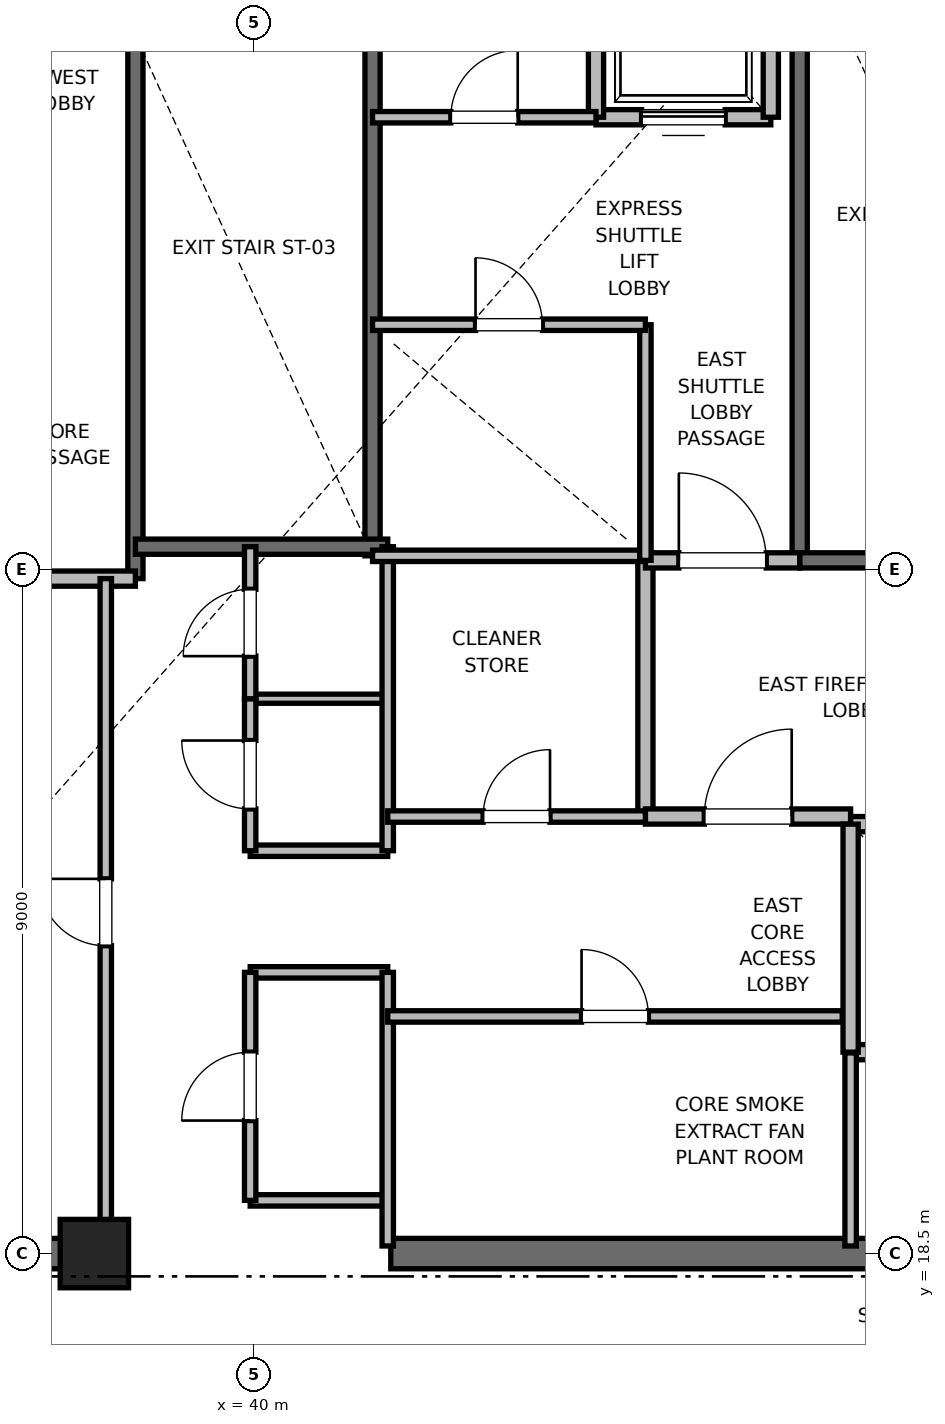
"""IFC4 building model, lengths in metres.
Left out: names, types, materials, properties, quantities, classifications, styles, units other than length and angle.
Written with IfcOpenShell. Run it as: python <this file> out.ifc"""

import sys

from ifc_helpers import new_model, si_unit, direction, frame, frame_2d, origin, origin_2d, place, context, subcontext, project, spatial, rectangle, extrude, element, fill, save


model = new_model("IFC4")
c1 = context("Model", 3, precision=1e-05, world=origin(), true_north=direction((0.0, 1.0)))
c2 = subcontext(c1, "Body", "Model", "MODEL_VIEW")
j1 = project(units=[si_unit("LENGTHUNIT", "METRE"), si_unit("PLANEANGLEUNIT", "RADIAN")], contexts=[c1])
p1 = place(None, origin())
s1 = spatial("IfcSite", under=j1, at=p1, CompositionType="ELEMENT")
p2 = place(p1, origin())
s2 = spatial("IfcBuilding", under=s1, at=p2, CompositionType="ELEMENT")
p3 = place(p2, frame((0.0, 0.0, 354.3)))
s3 = spatial("IfcBuildingStorey", under=s2, at=p3, CompositionType="ELEMENT", Elevation=354.3)
p4 = place(p3, frame((37.9, 18.5, 0.0), z_axis=(0.0, 0.0, 1.0), x_axis=(1.0, 0.0, 0.0)))
e1 = element("IfcColumn", 1, at=p4, inside=s3, PredefinedType="PILASTER", context=c2, shape_type="SweptSolid", body=[
    extrude(rectangle(XDim=0.9, YDim=0.9, at=origin_2d()), origin(), (0.0, 0.0, 1.0), 5.5),
])
for number, where, z_axis, x_axis in (
    (2, (29.0, 18.5, 0.0), (0.0, 0.0, 1.0), (1.0, 0.0, 0.0)),
    (3, (41.8, 18.5, 0.0), (0.0, 0.0, 1.0), (1.0, 0.0, 0.0)),
):
    element("IfcWall", number, at=place(p3, frame(where, z_axis=z_axis, x_axis=x_axis)), inside=s3, PredefinedType="SHEAR", context=c2, shape_type="SweptSolid", body=[
        extrude(rectangle(XDim=9.2, YDim=0.4, at=frame_2d((4.6, 0.0))), origin(), (0.0, 0.0, 1.0), 5.24),
    ])
p5 = place(p3, frame((47.18, 27.62, 0.0), z_axis=(0.0, 0.0, 1.0), x_axis=(0.0, 1.0, 0.0)))
e4 = element("IfcWall", 4, at=p5, inside=s3, PredefinedType="SOLIDWALL", context=c2, shape_type="SweptSolid", body=[
    extrude(rectangle(XDim=8.18, YDim=0.2, at=frame_2d((4.09, 0.0))), origin(), (0.0, 0.0, 1.0), 5.24),
])
p6 = place(p3, frame((47.18, 27.62, 0.0), z_axis=(0.0, 0.0, 1.0), x_axis=(1.0, 0.0, 0.0)))
e5 = element("IfcWall", 5, at=p6, inside=s3, PredefinedType="SOLIDWALL", context=c2, shape_type="SweptSolid", body=[
    extrude(rectangle(XDim=3.12, YDim=0.2, at=frame_2d((1.56, 0.0))), origin(), (0.0, 0.0, 1.0), 5.24),
])
p7 = place(p6, frame((1.01, 0.0, 0.0)))
e6 = element("IfcOpeningElement", 6, at=p7, cuts=e5, PredefinedType="OPENING", context=c2, shape_type="SweptSolid", body=[
    extrude(rectangle(XDim=1.1, YDim=2.15, at=frame_2d((0.55, 1.075))), frame((0.0, 0.1, 0.0), z_axis=(0.0, -1.0, 0.0), x_axis=(1.0, 0.0, 0.0)), (0.0, 0.0, 1.0), 0.2),
])
p8 = place(p3, frame((38.44, 27.38, 0.0), z_axis=(0.0, 0.0, 1.0), x_axis=(0.0, 1.0, 0.0)))
e7 = element("IfcWall", 7, at=p8, inside=s3, PredefinedType="SOLIDWALL", context=c2, shape_type="SweptSolid", body=[
    extrude(rectangle(XDim=8.87, YDim=0.2, at=frame_2d((4.435, 0.0))), origin(), (0.0, 0.0, 1.0), 5.24),
])
p9 = place(p3, frame((41.56, 27.68, 0.0), z_axis=(0.0, 0.0, 1.0), x_axis=(0.0, 1.0, 0.0)))
e8 = element("IfcWall", 8, at=p9, inside=s3, PredefinedType="SOLIDWALL", context=c2, shape_type="SweptSolid", body=[
    extrude(rectangle(XDim=8.57, YDim=0.2, at=frame_2d((4.285, 0.0))), origin(), (0.0, 0.0, 1.0), 5.24),
])
p10 = place(p3, frame((38.44, 27.8, 0.0), z_axis=(0.0, 0.0, 1.0), x_axis=(1.0, 0.0, 0.0)))
e9 = element("IfcWall", 9, at=p10, inside=s3, PredefinedType="SOLIDWALL", context=c2, shape_type="SweptSolid", body=[
    extrude(rectangle(XDim=3.32, YDim=0.2, at=frame_2d((1.66, 0.0))), origin(), (0.0, 0.0, 1.0), 5.24),
])
p11 = place(p3, frame((32.82, 27.38, 0.0), z_axis=(0.0, 0.0, 1.0), x_axis=(1.0, 0.0, 0.0)))
e10 = element("IfcWall", 10, at=p11, inside=s3, PredefinedType="PARTITIONING", context=c2, shape_type="SweptSolid", body=[
    extrude(rectangle(XDim=5.62, YDim=0.2, at=frame_2d((2.81, 0.0))), origin(), (0.0, 0.0, 1.0), 5.24),
])
p12 = place(p3, frame((45.15, 24.25, 0.0), z_axis=(0.0, 0.0, 1.0), x_axis=(0.0, 1.0, 0.0)))
e11 = element("IfcWall", 11, at=p12, inside=s3, PredefinedType="PARTITIONING", context=c2, shape_type="SweptSolid", body=[
    extrude(rectangle(XDim=3.37, YDim=0.2, at=frame_2d((1.685, 0.0))), origin(), (0.0, 0.0, 1.0), 5.24),
])
p13 = place(p3, frame((45.15, 24.25, 0.0), z_axis=(0.0, 0.0, 1.0), x_axis=(1.0, 0.0, 0.0)))
e12 = element("IfcWall", 12, at=p13, inside=s3, PredefinedType="PARTITIONING", context=c2, shape_type="SweptSolid", body=[
    extrude(rectangle(XDim=2.7, YDim=0.2, at=frame_2d((1.35, 0.0))), origin(), (0.0, 0.0, 1.0), 5.24),
])
p14 = place(p13, frame((0.775, 0.0, 0.0)))
e13 = element("IfcOpeningElement", 13, at=p14, cuts=e12, PredefinedType="OPENING", context=c2, shape_type="SweptSolid", body=[
    extrude(rectangle(XDim=1.15, YDim=2.2, at=frame_2d((0.575, 1.1))), frame((0.0, 0.1, 0.0), z_axis=(0.0, -1.0, 0.0), x_axis=(1.0, 0.0, 0.0)), (0.0, 0.0, 1.0), 0.2),
])
p15 = place(p3, frame((45.15, 27.62, 0.0), z_axis=(0.0, 0.0, 1.0), x_axis=(1.0, 0.0, 0.0)))
e14 = element("IfcWall", 14, at=p15, inside=s3, PredefinedType="PARTITIONING", context=c2, shape_type="SweptSolid", body=[
    extrude(rectangle(XDim=2.03, YDim=0.2, at=frame_2d((1.015, 0.0))), origin(), (0.0, 0.0, 1.0), 5.24),
])
p16 = place(p15, frame((0.44, 0.0, 0.0)))
e15 = element("IfcOpeningElement", 15, at=p16, cuts=e14, PredefinedType="OPENING", context=c2, shape_type="SweptSolid", body=[
    extrude(rectangle(XDim=1.15, YDim=2.2, at=frame_2d((0.575, 1.1))), frame((0.0, 0.1, 0.0), z_axis=(0.0, -1.0, 0.0), x_axis=(1.0, 0.0, 0.0)), (0.0, 0.0, 1.0), 0.2),
])
p17 = place(p3, frame((47.85, 21.15, 0.0), z_axis=(0.0, 0.0, 1.0), x_axis=(1.0, 0.0, 0.0)))
e16 = element("IfcWall", 16, at=p17, inside=s3, PredefinedType="SOLIDWALL", context=c2, shape_type="SweptSolid", body=[
    extrude(rectangle(XDim=2.6, YDim=0.2, at=frame_2d((1.3, 0.0))), origin(), (0.0, 0.0, 1.0), 5.24),
])
p18 = place(p3, frame((50.45, 24.15, 0.0), z_axis=(0.0, 0.0, 1.0), x_axis=(-1.0, 0.0, 0.0)))
e17 = element("IfcWall", 17, at=p18, inside=s3, PredefinedType="SOLIDWALL", context=c2, shape_type="SweptSolid", body=[
    extrude(rectangle(XDim=2.6, YDim=0.2, at=frame_2d((1.3, 0.0))), origin(), (0.0, 0.0, 1.0), 4.32),
])
p19 = place(p18, frame((0.75, 0.0, 0.0)))
e18 = element("IfcOpeningElement", 18, at=p19, cuts=e17, PredefinedType="OPENING", context=c2, shape_type="SweptSolid", body=[
    extrude(rectangle(XDim=1.1, YDim=2.2, at=frame_2d((0.55, 1.1))), frame((0.0, 0.1, 0.0), z_axis=(0.0, -1.0, 0.0), x_axis=(1.0, 0.0, 0.0)), (0.0, 0.0, 1.0), 0.2),
])
p20 = place(p3, frame((47.85, 24.15, 0.0), z_axis=(0.0, 0.0, 1.0), x_axis=(0.0, -1.0, 0.0)))
e19 = element("IfcWall", 19, at=p20, inside=s3, PredefinedType="SOLIDWALL", context=c2, shape_type="SweptSolid", body=[
    extrude(rectangle(XDim=3.0, YDim=0.2, at=frame_2d((1.5, 0.0))), origin(), (0.0, 0.0, 1.0), 5.24),
])
p21 = place(p3, frame((44.5, 33.45, 0.0), z_axis=(0.0, 0.0, 1.0), x_axis=(1.0, 0.0, 0.0)))
e20 = element("IfcWall", 20, at=p21, inside=s3, PredefinedType="SOLIDWALL", context=c2, shape_type="SweptSolid", body=[
    extrude(rectangle(XDim=2.3, YDim=0.2, at=frame_2d((1.15, 0.0))), origin(), (0.0, 0.0, 1.0), 5.24),
])
p22 = place(p21, frame((0.6, 0.0, 0.0)))
e21 = element("IfcOpeningElement", 21, at=p22, cuts=e20, PredefinedType="OPENING", context=c2, shape_type="SweptSolid", body=[
    extrude(rectangle(XDim=1.1, YDim=2.2, at=frame_2d((0.55, 1.1))), frame((0.0, 0.1, 0.0), z_axis=(0.0, -1.0, 0.0), x_axis=(1.0, 0.0, 0.0)), (0.0, 0.0, 1.0), 0.2),
])
p23 = place(p3, frame((44.5, 36.05, 0.0), z_axis=(0.0, 0.0, 1.0), x_axis=(0.0, -1.0, 0.0)))
e22 = element("IfcWall", 22, at=p23, inside=s3, PredefinedType="SOLIDWALL", context=c2, shape_type="SweptSolid", body=[
    extrude(rectangle(XDim=2.6, YDim=0.2, at=frame_2d((1.3, 0.0))), origin(), (0.0, 0.0, 1.0), 4.32),
])
p24 = place(p3, frame((46.8, 33.45, 0.0), z_axis=(0.0, 0.0, 1.0), x_axis=(0.0, 1.0, 0.0)))
e23 = element("IfcWall", 23, at=p24, inside=s3, PredefinedType="SOLIDWALL", context=c2, shape_type="SweptSolid", body=[
    extrude(rectangle(XDim=2.6, YDim=0.2, at=frame_2d((1.3, 0.0))), origin(), (0.0, 0.0, 1.0), 5.24),
])
for number, where, z_axis, x_axis in (
    (24, (39.95, 19.2, 0.0), (0.0, 0.0, 1.0), (1.0, 0.0, 0.0)),
    (25, (39.95, 22.2, 0.0), (0.0, 0.0, 1.0), (1.0, 0.0, 0.0)),
    (26, (39.95, 23.8, 0.0), (0.0, 0.0, 1.0), (1.0, 0.0, 0.0)),
):
    element("IfcWall", number, at=place(p3, frame(where, z_axis=z_axis, x_axis=x_axis)), inside=s3, PredefinedType="PARTITIONING", context=c2, shape_type="SweptSolid", body=[
        extrude(rectangle(XDim=1.81, YDim=0.15, at=frame_2d((0.905, 0.0))), origin(), (0.0, 0.0, 1.0), 2.85),
    ])
p25 = place(p3, frame((39.95, 25.8, 0.0), z_axis=(0.0, 0.0, 1.0), x_axis=(1.0, 0.0, 0.0)))
e27 = element("IfcWall", 27, at=p25, inside=s3, PredefinedType="PARTITIONING", context=c2, shape_type="SweptSolid", body=[
    extrude(rectangle(XDim=1.81, YDim=0.12, at=frame_2d((0.905, 0.0))), origin(), (0.0, 0.0, 1.0), 2.85),
])
p26 = place(p3, frame((41.76, 18.6, 0.0), z_axis=(0.0, 0.0, 1.0), x_axis=(0.0, 1.0, 0.0)))
e28 = element("IfcWall", 28, at=p26, inside=s3, PredefinedType="PARTITIONING", context=c2, shape_type="SweptSolid", body=[
    extrude(rectangle(XDim=3.6, YDim=0.15, at=frame_2d((1.8, 0.0))), origin(), (0.0, 0.0, 1.0), 2.85),
])
p27 = place(p3, frame((41.76, 23.8, 0.0), z_axis=(0.0, 0.0, 1.0), x_axis=(0.0, 1.0, 0.0)))
e29 = element("IfcWall", 29, at=p27, inside=s3, PredefinedType="PARTITIONING", context=c2, shape_type="SweptSolid", body=[
    extrude(rectangle(XDim=4.0, YDim=0.15, at=frame_2d((2.0, 0.0))), origin(), (0.0, 0.0, 1.0), 2.85),
])
p28 = place(p3, frame((39.95, 19.2, 0.0), z_axis=(0.0, 0.0, 1.0), x_axis=(0.0, 1.0, 0.0)))
e30 = element("IfcWall", 30, at=p28, inside=s3, PredefinedType="PARTITIONING", context=c2, shape_type="SweptSolid", body=[
    extrude(rectangle(XDim=3.0, YDim=0.15, at=frame_2d((1.5, 0.0))), origin(), (0.0, 0.0, 1.0), 2.85),
])
p29 = place(p28, frame((1.05, 0.0, 0.0)))
e31 = element("IfcOpeningElement", 31, at=p29, cuts=e30, PredefinedType="OPENING", context=c2, shape_type="SweptSolid", body=[
    extrude(rectangle(XDim=0.9, YDim=2.1, at=frame_2d((0.45, 1.05))), frame((0.0, 0.075, 0.0), z_axis=(0.0, -1.0, 0.0), x_axis=(1.0, 0.0, 0.0)), (0.0, 0.0, 1.0), 0.15),
])
p30 = place(p3, frame((39.95, 23.8, 0.0), z_axis=(0.0, 0.0, 1.0), x_axis=(0.0, 1.0, 0.0)))
e32 = element("IfcWall", 32, at=p30, inside=s3, PredefinedType="PARTITIONING", context=c2, shape_type="SweptSolid", body=[
    extrude(rectangle(XDim=2.0, YDim=0.15, at=frame_2d((1.0, 0.0))), origin(), (0.0, 0.0, 1.0), 2.85),
])
p31 = place(p30, frame((0.55, 0.0, 0.0)))
e33 = element("IfcOpeningElement", 33, at=p31, cuts=e32, PredefinedType="OPENING", context=c2, shape_type="SweptSolid", body=[
    extrude(rectangle(XDim=0.9, YDim=2.1, at=frame_2d((0.45, 1.05))), frame((0.0, 0.075, 0.0), z_axis=(0.0, -1.0, 0.0), x_axis=(1.0, 0.0, 0.0)), (0.0, 0.0, 1.0), 0.15),
])
p32 = place(p3, frame((39.95, 25.8, 0.0), z_axis=(0.0, 0.0, 1.0), x_axis=(0.0, 1.0, 0.0)))
e34 = element("IfcWall", 34, at=p32, inside=s3, PredefinedType="PARTITIONING", context=c2, shape_type="SweptSolid", body=[
    extrude(rectangle(XDim=2.0, YDim=0.15, at=frame_2d((1.0, 0.0))), origin(), (0.0, 0.0, 1.0), 2.85),
])
p33 = place(p32, frame((0.56, 0.0, 0.0)))
e35 = element("IfcOpeningElement", 35, at=p33, cuts=e34, PredefinedType="OPENING", context=c2, shape_type="SweptSolid", body=[
    extrude(rectangle(XDim=0.88, YDim=2.1, at=frame_2d((0.44, 1.05))), frame((0.0, 0.075, 0.0), z_axis=(0.0, -1.0, 0.0), x_axis=(1.0, 0.0, 0.0)), (0.0, 0.0, 1.0), 0.15),
])
p34 = place(p3, frame((38.05, 18.6, 0.0), z_axis=(0.0, 0.0, 1.0), x_axis=(0.0, 1.0, 0.0)))
e36 = element("IfcWall", 36, at=p34, inside=s3, PredefinedType="PARTITIONING", context=c2, shape_type="SweptSolid", body=[
    extrude(rectangle(XDim=8.78, YDim=0.15, at=frame_2d((4.39, 0.0))), origin(), (0.0, 0.0, 1.0), 2.85),
])
p35 = place(p34, frame((3.95, 0.0, 0.0)))
e37 = element("IfcOpeningElement", 37, at=p35, cuts=e36, PredefinedType="OPENING", context=c2, shape_type="SweptSolid", body=[
    extrude(rectangle(XDim=0.88, YDim=2.1, at=frame_2d((0.44, 1.05))), frame((0.0, 0.075, 0.0), z_axis=(0.0, -1.0, 0.0), x_axis=(1.0, 0.0, 0.0)), (0.0, 0.0, 1.0), 0.15),
])
p36 = place(p3, frame((41.56, 27.68, 0.0), z_axis=(0.0, 0.0, 1.0), x_axis=(1.0, 0.0, 0.0)))
e38 = element("IfcWall", 38, at=p36, inside=s3, PredefinedType="PARTITIONING", context=c2, shape_type="SweptSolid", body=[
    extrude(rectangle(XDim=3.59, YDim=0.15, at=frame_2d((1.795, 0.0))), origin(), (0.0, 0.0, 1.0), 2.85),
])
p37 = place(p3, frame((47.85, 18.6, 0.0), z_axis=(0.0, 0.0, 1.0), x_axis=(0.0, 1.0, 0.0)))
e39 = element("IfcWall", 39, at=p37, inside=s3, PredefinedType="PARTITIONING", context=c2, shape_type="SweptSolid", body=[
    extrude(rectangle(XDim=2.54, YDim=0.15, at=frame_2d((1.27, 0.0))), origin(), (0.0, 0.0, 1.0), 2.85),
])
p38 = place(p3, frame((41.76, 21.62, 0.0), z_axis=(0.0, 0.0, 1.0), x_axis=(1.0, 0.0, 0.0)))
e40 = element("IfcWall", 40, at=p38, inside=s3, PredefinedType="PARTITIONING", context=c2, shape_type="SweptSolid", body=[
    extrude(rectangle(XDim=5.98, YDim=0.15, at=frame_2d((2.99, 0.0))), origin(), (0.0, 0.0, 1.0), 2.85),
])
p39 = place(p38, frame((2.55, 0.0, 0.0)))
e41 = element("IfcOpeningElement", 41, at=p39, cuts=e40, PredefinedType="OPENING", context=c2, shape_type="SweptSolid", body=[
    extrude(rectangle(XDim=0.88, YDim=2.1, at=frame_2d((0.44, 1.05))), frame((0.0, 0.075, 0.0), z_axis=(0.0, -1.0, 0.0), x_axis=(1.0, 0.0, 0.0)), (0.0, 0.0, 1.0), 0.15),
])
p40 = place(p3, frame((41.76, 24.25, 0.0), z_axis=(0.0, 0.0, 1.0), x_axis=(1.0, 0.0, 0.0)))
e42 = element("IfcWall", 42, at=p40, inside=s3, PredefinedType="PARTITIONING", context=c2, shape_type="SweptSolid", body=[
    extrude(rectangle(XDim=3.39, YDim=0.15, at=frame_2d((1.695, 0.0))), origin(), (0.0, 0.0, 1.0), 2.85),
])
p41 = place(p40, frame((1.255, 0.0, 0.0)))
e43 = element("IfcOpeningElement", 43, at=p41, cuts=e42, PredefinedType="OPENING", context=c2, shape_type="SweptSolid", body=[
    extrude(rectangle(XDim=0.88, YDim=2.1, at=frame_2d((0.44, 1.05))), frame((0.0, 0.075, 0.0), z_axis=(0.0, -1.0, 0.0), x_axis=(1.0, 0.0, 0.0)), (0.0, 0.0, 1.0), 0.15),
])
p42 = place(p3, frame((45.15, 27.62, 0.0), z_axis=(0.0, 0.0, 1.0), x_axis=(0.0, 1.0, 0.0)))
e44 = element("IfcWall", 44, at=p42, inside=s3, PredefinedType="PARTITIONING", context=c2, shape_type="SweptSolid", body=[
    extrude(rectangle(XDim=3.1, YDim=0.15, at=frame_2d((1.55, 0.0))), origin(), (0.0, 0.0, 1.0), 2.85),
])
p43 = place(p3, frame((41.56, 30.72, 0.0), z_axis=(0.0, 0.0, 1.0), x_axis=(1.0, 0.0, 0.0)))
e45 = element("IfcWall", 45, at=p43, inside=s3, PredefinedType="PARTITIONING", context=c2, shape_type="SweptSolid", body=[
    extrude(rectangle(XDim=3.59, YDim=0.15, at=frame_2d((1.795, 0.0))), origin(), (0.0, 0.0, 1.0), 2.85),
])
p44 = place(p43, frame((1.355, 0.0, 0.0)))
e46 = element("IfcOpeningElement", 46, at=p44, cuts=e45, PredefinedType="OPENING", context=c2, shape_type="SweptSolid", body=[
    extrude(rectangle(XDim=0.88, YDim=2.1, at=frame_2d((0.44, 1.05))), frame((0.0, 0.075, 0.0), z_axis=(0.0, -1.0, 0.0), x_axis=(1.0, 0.0, 0.0)), (0.0, 0.0, 1.0), 0.15),
])
p45 = place(p3, frame((41.56, 33.45, 0.0), z_axis=(0.0, 0.0, 1.0), x_axis=(1.0, 0.0, 0.0)))
e47 = element("IfcWall", 47, at=p45, inside=s3, PredefinedType="PARTITIONING", context=c2, shape_type="SweptSolid", body=[
    extrude(rectangle(XDim=2.94, YDim=0.15, at=frame_2d((1.47, 0.0))), origin(), (0.0, 0.0, 1.0), 2.85),
])
p46 = place(p45, frame((1.03, 0.0, 0.0)))
e48 = element("IfcOpeningElement", 48, at=p46, cuts=e47, PredefinedType="OPENING", context=c2, shape_type="SweptSolid", body=[
    extrude(rectangle(XDim=0.88, YDim=2.1, at=frame_2d((0.44, 1.05))), frame((0.0, 0.075, 0.0), z_axis=(0.0, -1.0, 0.0), x_axis=(1.0, 0.0, 0.0)), (0.0, 0.0, 1.0), 0.15),
])
p47 = place(p14, origin())
e49 = element("IfcDoor", 49, at=p47, inside=s3, OperationType="SINGLE_SWING_RIGHT", PredefinedType="DOOR", context=c2, shape_type="SweptSolid", body=[
    extrude(rectangle(XDim=1.15, YDim=2.2, at=frame_2d((0.575, 1.1))), frame((0.0, 0.025, 0.0), z_axis=(0.0, -1.0, 0.0), x_axis=(1.0, 0.0, 0.0)), (0.0, 0.0, 1.0), 0.05),
])
fill(e13, e49)
p48 = place(p16, origin())
e50 = element("IfcDoor", 50, at=p48, inside=s3, OperationType="SINGLE_SWING_LEFT", PredefinedType="DOOR", context=c2, shape_type="SweptSolid", body=[
    extrude(rectangle(XDim=1.15, YDim=2.2, at=frame_2d((0.575, 1.1))), frame((0.0, 0.025, 0.0), z_axis=(0.0, -1.0, 0.0), x_axis=(1.0, 0.0, 0.0)), (0.0, 0.0, 1.0), 0.05),
])
fill(e15, e50)
p49 = place(p22, origin())
e51 = element("IfcDoor", 51, at=p49, inside=s3, OperationType="SLIDING_TO_RIGHT", PredefinedType="DOOR", context=c2, shape_type="SweptSolid", body=[
    extrude(rectangle(XDim=1.1, YDim=2.2, at=frame_2d((0.55, 1.1))), frame((0.0, 0.025, 0.0), z_axis=(0.0, -1.0, 0.0), x_axis=(1.0, 0.0, 0.0)), (0.0, 0.0, 1.0), 0.05),
])
fill(e21, e51)
p50 = place(p29, origin())
e52 = element("IfcDoor", 52, at=p50, inside=s3, OperationType="SINGLE_SWING_LEFT", PredefinedType="DOOR", context=c2, shape_type="SweptSolid", body=[
    extrude(rectangle(XDim=0.9, YDim=2.1, at=frame_2d((0.45, 1.05))), frame((0.0, 0.025, 0.0), z_axis=(0.0, -1.0, 0.0), x_axis=(1.0, 0.0, 0.0)), (0.0, 0.0, 1.0), 0.05),
])
fill(e31, e52)
p51 = place(p31, origin())
e53 = element("IfcDoor", 53, at=p51, inside=s3, OperationType="SINGLE_SWING_RIGHT", PredefinedType="DOOR", context=c2, shape_type="SweptSolid", body=[
    extrude(rectangle(XDim=0.9, YDim=2.1, at=frame_2d((0.45, 1.05))), frame((0.0, 0.025, 0.0), z_axis=(0.0, -1.0, 0.0), x_axis=(1.0, 0.0, 0.0)), (0.0, 0.0, 1.0), 0.05),
])
fill(e33, e53)
p52 = place(p33, origin())
e54 = element("IfcDoor", 54, at=p52, inside=s3, OperationType="SINGLE_SWING_LEFT", PredefinedType="DOOR", context=c2, shape_type="SweptSolid", body=[
    extrude(rectangle(XDim=0.88, YDim=2.1, at=frame_2d((0.44, 1.05))), frame((0.0, 0.025, 0.0), z_axis=(0.0, -1.0, 0.0), x_axis=(1.0, 0.0, 0.0)), (0.0, 0.0, 1.0), 0.05),
])
fill(e35, e54)
p53 = place(p35, origin())
e55 = element("IfcDoor", 55, at=p53, inside=s3, OperationType="SINGLE_SWING_RIGHT", PredefinedType="DOOR", context=c2, shape_type="SweptSolid", body=[
    extrude(rectangle(XDim=0.88, YDim=2.1, at=frame_2d((0.44, 1.05))), frame((0.0, 0.025, 0.0), z_axis=(0.0, -1.0, 0.0), x_axis=(1.0, 0.0, 0.0)), (0.0, 0.0, 1.0), 0.05),
])
fill(e37, e55)
p54 = place(p39, origin())
e56 = element("IfcDoor", 56, at=p54, inside=s3, OperationType="SINGLE_SWING_LEFT", PredefinedType="DOOR", context=c2, shape_type="SweptSolid", body=[
    extrude(rectangle(XDim=0.88, YDim=2.1, at=frame_2d((0.44, 1.05))), frame((0.0, 0.025, 0.0), z_axis=(0.0, -1.0, 0.0), x_axis=(1.0, 0.0, 0.0)), (0.0, 0.0, 1.0), 0.05),
])
fill(e41, e56)
p55 = place(p41, origin())
e57 = element("IfcDoor", 57, at=p55, inside=s3, OperationType="SINGLE_SWING_RIGHT", PredefinedType="DOOR", context=c2, shape_type="SweptSolid", body=[
    extrude(rectangle(XDim=0.88, YDim=2.1, at=frame_2d((0.44, 1.05))), frame((0.0, 0.025, 0.0), z_axis=(0.0, -1.0, 0.0), x_axis=(1.0, 0.0, 0.0)), (0.0, 0.0, 1.0), 0.05),
])
fill(e43, e57)
p56 = place(p44, origin())
e58 = element("IfcDoor", 58, at=p56, inside=s3, OperationType="SINGLE_SWING_LEFT", PredefinedType="DOOR", context=c2, shape_type="SweptSolid", body=[
    extrude(rectangle(XDim=0.88, YDim=2.1, at=frame_2d((0.44, 1.05))), frame((0.0, 0.025, 0.0), z_axis=(0.0, -1.0, 0.0), x_axis=(1.0, 0.0, 0.0)), (0.0, 0.0, 1.0), 0.05),
])
fill(e46, e58)
p57 = place(p46, origin())
e59 = element("IfcDoor", 59, at=p57, inside=s3, OperationType="SINGLE_SWING_RIGHT", PredefinedType="DOOR", context=c2, shape_type="SweptSolid", body=[
    extrude(rectangle(XDim=0.88, YDim=2.1, at=frame_2d((0.44, 1.05))), frame((0.0, 0.025, 0.0), z_axis=(0.0, -1.0, 0.0), x_axis=(1.0, 0.0, 0.0)), (0.0, 0.0, 1.0), 0.05),
])
fill(e48, e59)
save(model, sys.argv[1])
